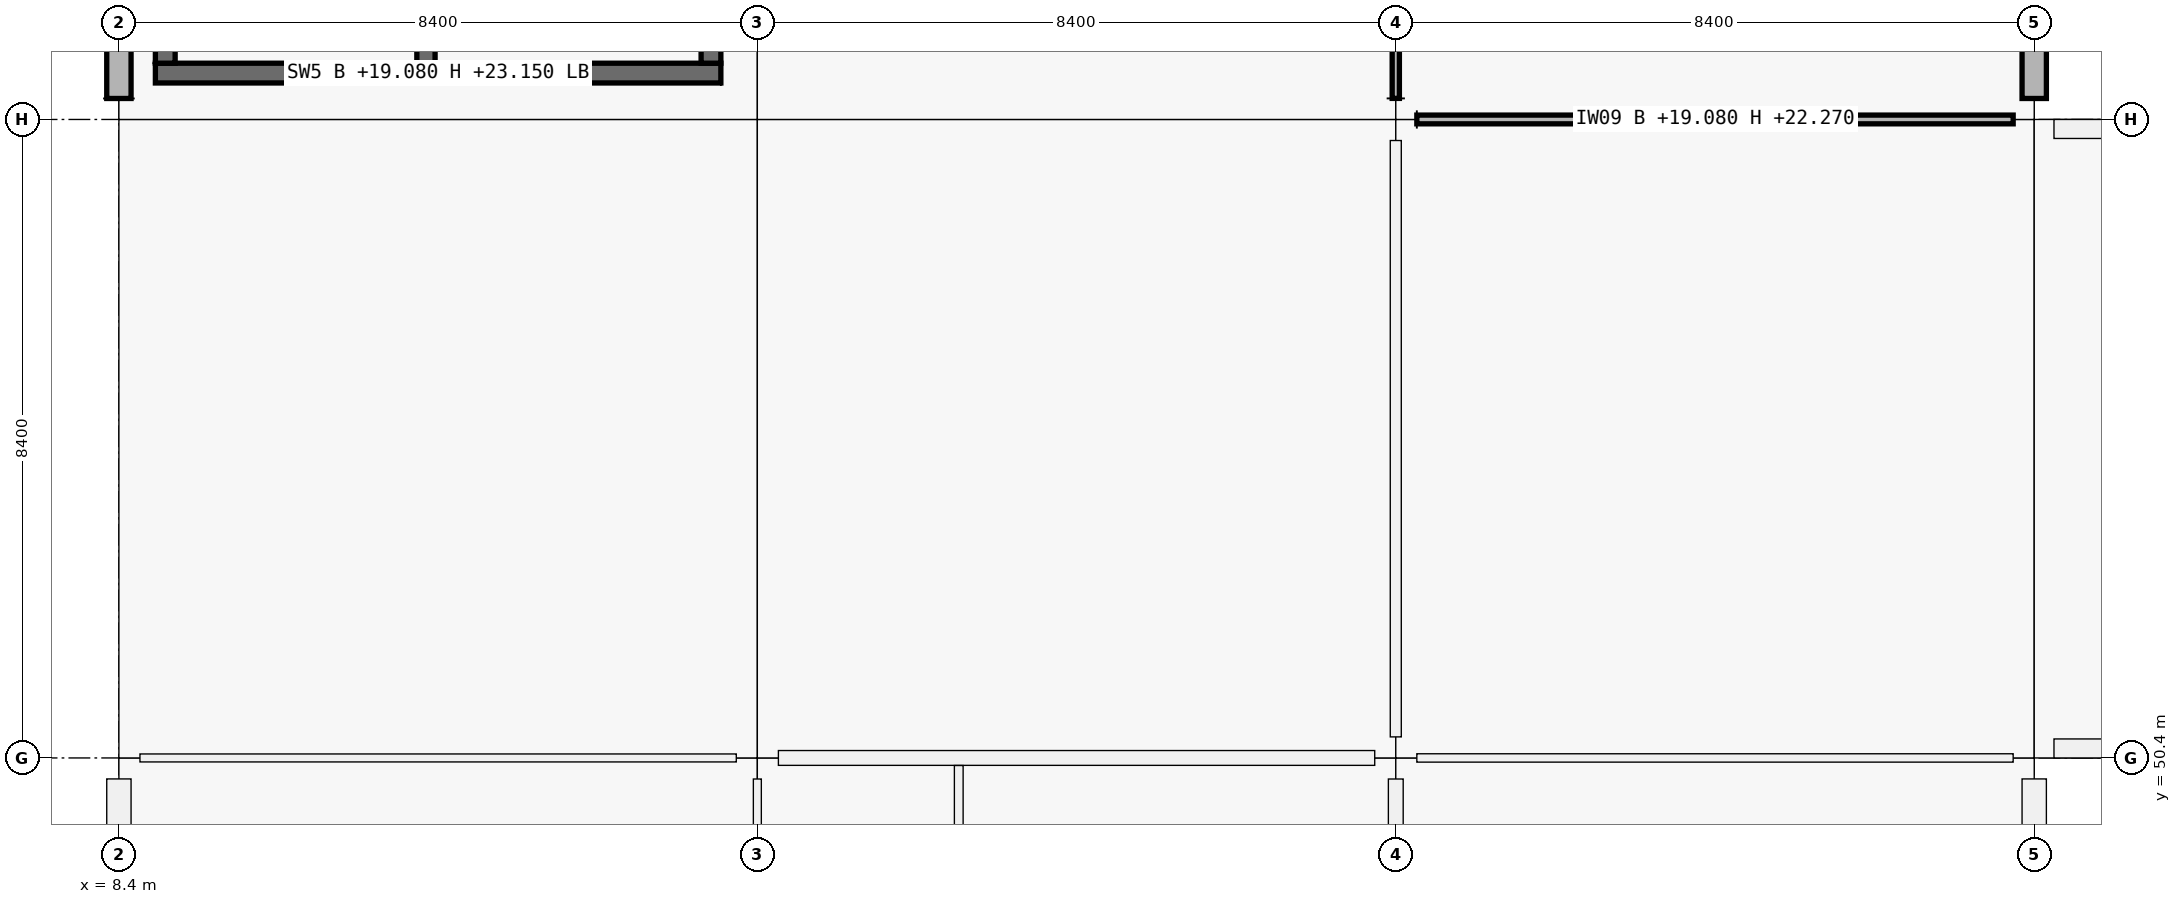
"""IFC4 building model, lengths in metres.
Left out: names, types, materials, properties, quantities, classifications, styles, units other than length and angle.
Written with IfcOpenShell. Run it as: python <this file> out.ifc"""

import sys

from ifc_helpers import new_model, si_unit, direction, frame, frame_2d, origin, origin_2d, place, context, subcontext, project, spatial, rectangle, i_section, extrude, element, fill, save


model = new_model("IFC4")
c1 = context("Model", 3, precision=1e-05, world=origin(), true_north=direction((0.0, 1.0)))
c2 = subcontext(c1, "Body", "Model", "MODEL_VIEW")
j1 = project(units=[si_unit("LENGTHUNIT", "METRE"), si_unit("PLANEANGLEUNIT", "RADIAN")], contexts=[c1])
p1 = place(None, origin())
s1 = spatial("IfcSite", under=j1, at=p1, CompositionType="ELEMENT")
p2 = place(p1, origin())
s2 = spatial("IfcBuilding", under=s1, at=p2, CompositionType="ELEMENT")
p3 = place(p2, frame((0.0, 0.0, 19.08)))
s3 = spatial("IfcBuildingStorey", under=s2, at=p3, CompositionType="ELEMENT", Elevation=19.08)
for number, where, z_axis, x_axis in (
    (1, (8.4, 50.4, 0.0), (0.0, 0.0, 1.0), (1.0, 0.0, 0.0)),
    (2, (8.4, 58.8, 0.0), (0.0, 0.0, 1.0), (1.0, 0.0, 0.0)),
    (3, (16.8, 50.4, 0.0), (0.0, 0.0, 1.0), (1.0, 0.0, 0.0)),
    (4, (16.8, 58.8, 0.0), (0.0, 0.0, 1.0), (1.0, 0.0, 0.0)),
    (5, (25.2, 50.4, 0.0), (0.0, 0.0, 1.0), (1.0, 0.0, 0.0)),
    (6, (25.2, 58.8, 0.0), (0.0, 0.0, 1.0), (1.0, 0.0, 0.0)),
    (7, (33.6, 50.4, 0.0), (0.0, 0.0, 1.0), (1.0, 0.0, 0.0)),
    (8, (33.6, 58.8, 0.0), (0.0, 0.0, 1.0), (1.0, 0.0, 0.0)),
):
    element("IfcColumn", number, at=place(p3, frame(where, z_axis=z_axis, x_axis=x_axis)), inside=s3, PredefinedType="COLUMN", context=c2, shape_type="SweptSolid", body=[
        extrude(rectangle(XDim=0.55, YDim=0.55, at=origin_2d()), origin(), (0.0, 0.0, 1.0), 4.16),
    ])
for number, where, z_axis, x_axis in (
    (9, (16.8, 50.4, 4.16), (0.0, 0.0, 1.0), (1.0, 0.0, 0.0)),
    (10, (25.2, 50.4, 4.16), (0.0, 0.0, 1.0), (1.0, 0.0, 0.0)),
    (11, (16.8, 58.8, 4.16), (0.0, 0.0, 1.0), (1.0, 0.0, 0.0)),
    (12, (25.2, 58.8, 4.16), (0.0, 0.0, 1.0), (1.0, 0.0, 0.0)),
):
    element("IfcColumn", number, at=place(p3, frame(where, z_axis=z_axis, x_axis=x_axis)), inside=s3, PredefinedType="COLUMN", context=c2, shape_type="SweptSolid", body=[
        extrude(i_section(OverallWidth=0.305, OverallDepth=0.308, WebThickness=0.01, FlangeThickness=0.015, FilletRadius=0.017, at=origin_2d()), origin(), (0.0, 0.0, 1.0), 1.925),
    ])
for number, where, z_axis, x_axis in (
    (13, (8.4, 42.276, 0.0), (0.0, 0.0, 1.0), (0.0, 1.0, 0.0)),
    (14, (8.4, 59.076, 0.0), (0.0, 0.0, 1.0), (0.0, 1.0, 0.0)),
):
    element("IfcWall", number, at=place(p3, frame(where, z_axis=z_axis, x_axis=x_axis)), inside=s3, PredefinedType="SOLIDWALL", context=c2, shape_type="SweptSolid", body=[
        extrude(rectangle(XDim=7.848, YDim=0.32, at=frame_2d((3.924, 0.0))), origin(), (0.0, 0.0, 1.0), 3.37),
    ])
p4 = place(p3, frame((33.6, 50.124, 0.0), z_axis=(0.0, 0.0, 1.0), x_axis=(0.0, -1.0, 0.0)))
e15 = element("IfcWall", 15, at=p4, inside=s3, PredefinedType="SOLIDWALL", context=c2, shape_type="SweptSolid", body=[
    extrude(rectangle(XDim=7.848, YDim=0.32, at=frame_2d((3.924, 0.0))), origin(), (0.0, 0.0, 1.0), 3.37),
])
p5 = place(p4, frame((3.174, 0.0, 0.9)))
e16 = element("IfcOpeningElement", 16, at=p5, cuts=e15, PredefinedType="OPENING", context=c2, shape_type="SweptSolid", body=[
    extrude(rectangle(XDim=1.5, YDim=1.2, at=frame_2d((0.75, 0.6))), frame((0.0, 0.16, 0.0), z_axis=(0.0, -1.0, 0.0), x_axis=(1.0, 0.0, 0.0)), (0.0, 0.0, 1.0), 0.32),
])
p6 = place(p3, frame((33.6, 66.924, 0.0), z_axis=(0.0, 0.0, 1.0), x_axis=(0.0, -1.0, 0.0)))
e17 = element("IfcWall", 17, at=p6, inside=s3, PredefinedType="SOLIDWALL", context=c2, shape_type="SweptSolid", body=[
    extrude(rectangle(XDim=7.848, YDim=0.32, at=frame_2d((3.924, 0.0))), origin(), (0.0, 0.0, 1.0), 3.37),
])
p7 = place(p6, frame((3.474, 0.0, 0.9)))
e18 = element("IfcOpeningElement", 18, at=p7, cuts=e17, PredefinedType="OPENING", context=c2, shape_type="SweptSolid", body=[
    extrude(rectangle(XDim=0.9, YDim=1.5, at=frame_2d((0.45, 0.75))), frame((0.0, 0.16, 0.0), z_axis=(0.0, -1.0, 0.0), x_axis=(1.0, 0.0, 0.0)), (0.0, 0.0, 1.0), 0.32),
])
for number, where, z_axis, x_axis in (
    (19, (41.74, 50.525, 0.0), (0.0, 0.0, 1.0), (-1.0, 0.0, 0.0)),
    (20, (33.86, 58.675, 0.0), (0.0, 0.0, 1.0), (1.0, 0.0, 0.0)),
):
    element("IfcWall", number, at=place(p3, frame(where, z_axis=z_axis, x_axis=x_axis)), inside=s3, PredefinedType="PARAPET", context=c2, shape_type="SweptSolid", body=[
        extrude(rectangle(XDim=7.88, YDim=0.25, at=frame_2d((3.94, 0.0))), origin(), (0.0, 0.0, 1.0), 0.95),
    ])
p8 = place(p3, frame((16.32, 59.41, 0.0), z_axis=(0.0, 0.0, 1.0), x_axis=(-1.0, 0.0, 0.0)))
e21 = element("IfcWall", 21, at=p8, inside=s3, PredefinedType="SHEAR", context=c2, shape_type="SweptSolid", body=[
    extrude(rectangle(XDim=7.44, YDim=0.26, at=frame_2d((3.72, 0.0))), origin(), (0.0, 0.0, 1.0), 4.07),
])
p9 = place(p8, frame((1.28, 0.0, 0.0)))
e22 = element("IfcOpeningElement", 22, at=p9, cuts=e21, PredefinedType="OPENING", context=c2, shape_type="SweptSolid", body=[
    extrude(rectangle(XDim=1.5, YDim=2.15, at=frame_2d((0.75, 1.075))), frame((0.0, 0.13, 0.0), z_axis=(0.0, -1.0, 0.0), x_axis=(1.0, 0.0, 0.0)), (0.0, 0.0, 1.0), 0.26),
])
for number, where, z_axis, x_axis in (
    (23, (9.01, 59.54, 0.0), (0.0, 0.0, 1.0), (0.0, 1.0, 0.0)),
    (24, (16.19, 66.46, 0.0), (0.0, 0.0, 1.0), (0.0, -1.0, 0.0)),
):
    element("IfcWall", number, at=place(p3, frame(where, z_axis=z_axis, x_axis=x_axis)), inside=s3, PredefinedType="SHEAR", context=c2, shape_type="SweptSolid", body=[
        extrude(rectangle(XDim=6.92, YDim=0.26, at=frame_2d((3.46, 0.0))), origin(), (0.0, 0.0, 1.0), 4.07),
    ])
p10 = place(p3, frame((12.44, 59.54, 0.0), z_axis=(0.0, 0.0, 1.0), x_axis=(0.0, 1.0, 0.0)))
e25 = element("IfcWall", 25, at=p10, inside=s3, PredefinedType="SHEAR", context=c2, shape_type="SweptSolid", body=[
    extrude(rectangle(XDim=6.92, YDim=0.24, at=frame_2d((3.46, 0.0))), origin(), (0.0, 0.0, 1.0), 4.07),
])
p11 = place(p10, frame((0.12, 0.0, 0.0)))
e26 = element("IfcOpeningElement", 26, at=p11, cuts=e25, PredefinedType="OPENING", context=c2, shape_type="SweptSolid", body=[
    extrude(rectangle(XDim=1.0, YDim=2.15, at=frame_2d((0.5, 1.075))), frame((0.0, 0.12, 0.0), z_axis=(0.0, -1.0, 0.0), x_axis=(1.0, 0.0, 0.0)), (0.0, 0.0, 1.0), 0.24),
])
p12 = place(p3, frame((8.677, 50.4, 0.0), z_axis=(0.0, 0.0, 1.0), x_axis=(1.0, 0.0, 0.0)))
e27 = element("IfcWall", 27, at=p12, inside=s3, PredefinedType="PARTITIONING", context=c2, shape_type="SweptSolid", body=[
    extrude(rectangle(XDim=7.846, YDim=0.105, at=frame_2d((3.923, 0.0))), origin(), (0.0, 0.0, 1.0), 3.19),
])
p13 = place(p12, frame((3.398, 0.0, 0.0)))
e28 = element("IfcOpeningElement", 28, at=p13, cuts=e27, PredefinedType="OPENING", context=c2, shape_type="SweptSolid", body=[
    extrude(rectangle(XDim=1.05, YDim=2.12, at=frame_2d((0.525, 1.06))), frame((0.0, 0.052, 0.0), z_axis=(0.0, -1.0, 0.0), x_axis=(1.0, 0.0, 0.0)), (0.0, 0.0, 1.0), 0.105),
])
p14 = place(p3, frame((17.077, 50.4, 0.0), z_axis=(0.0, 0.0, 1.0), x_axis=(1.0, 0.0, 0.0)))
e29 = element("IfcWall", 29, at=p14, inside=s3, PredefinedType="PARTITIONING", context=c2, shape_type="SweptSolid", body=[
    extrude(rectangle(XDim=7.846, YDim=0.195, at=frame_2d((3.923, 0.0))), origin(), (0.0, 0.0, 1.0), 3.19),
])
p15 = place(p14, frame((0.718, 0.0, 0.0)))
e30 = element("IfcOpeningElement", 30, at=p15, cuts=e29, PredefinedType="OPENING", context=c2, shape_type="SweptSolid", body=[
    extrude(rectangle(XDim=0.94, YDim=2.08, at=frame_2d((0.47, 1.04))), frame((0.0, 0.098, 0.0), z_axis=(0.0, -1.0, 0.0), x_axis=(1.0, 0.0, 0.0)), (0.0, 0.0, 1.0), 0.195),
])
p16 = place(p14, frame((4.628, 0.0, 0.0)))
e31 = element("IfcOpeningElement", 31, at=p16, cuts=e29, PredefinedType="OPENING", context=c2, shape_type="SweptSolid", body=[
    extrude(rectangle(XDim=0.96, YDim=2.1, at=frame_2d((0.48, 1.05))), frame((0.0, 0.098, 0.0), z_axis=(0.0, -1.0, 0.0), x_axis=(1.0, 0.0, 0.0)), (0.0, 0.0, 1.0), 0.195),
])
p17 = place(p3, frame((25.477, 50.4, 0.0), z_axis=(0.0, 0.0, 1.0), x_axis=(1.0, 0.0, 0.0)))
e32 = element("IfcWall", 32, at=p17, inside=s3, PredefinedType="MOVABLE", context=c2, shape_type="SweptSolid", body=[
    extrude(rectangle(XDim=7.846, YDim=0.11, at=frame_2d((3.923, 0.0))), origin(), (0.0, 0.0, 1.0), 3.19),
])
p18 = place(p17, frame((3.433, 0.0, 0.0)))
e33 = element("IfcOpeningElement", 33, at=p18, cuts=e32, PredefinedType="OPENING", context=c2, shape_type="SweptSolid", body=[
    extrude(rectangle(XDim=0.98, YDim=2.18, at=frame_2d((0.49, 1.09))), frame((0.0, 0.055, 0.0), z_axis=(0.0, -1.0, 0.0), x_axis=(1.0, 0.0, 0.0)), (0.0, 0.0, 1.0), 0.11),
])
p19 = place(p3, frame((25.477, 58.8, 0.0), z_axis=(0.0, 0.0, 1.0), x_axis=(1.0, 0.0, 0.0)))
e34 = element("IfcWall", 34, at=p19, inside=s3, PredefinedType="PARTITIONING", context=c2, shape_type="SweptSolid", body=[
    extrude(rectangle(XDim=7.846, YDim=0.115, at=frame_2d((3.923, 0.0))), origin(), (0.0, 0.0, 1.0), 3.19),
])
p20 = place(p19, frame((3.443, 0.0, 0.0)))
e35 = element("IfcOpeningElement", 35, at=p20, cuts=e34, PredefinedType="OPENING", context=c2, shape_type="SweptSolid", body=[
    extrude(rectangle(XDim=0.96, YDim=2.18, at=frame_2d((0.48, 1.09))), frame((0.0, 0.058, 0.0), z_axis=(0.0, -1.0, 0.0), x_axis=(1.0, 0.0, 0.0)), (0.0, 0.0, 1.0), 0.115),
])
p21 = place(p3, frame((16.8, 42.277, 0.0), z_axis=(0.0, 0.0, 1.0), x_axis=(0.0, 1.0, 0.0)))
e36 = element("IfcWall", 36, at=p21, inside=s3, PredefinedType="PARTITIONING", context=c2, shape_type="SweptSolid", body=[
    extrude(rectangle(XDim=7.846, YDim=0.105, at=frame_2d((3.923, 0.0))), origin(), (0.0, 0.0, 1.0), 3.19),
])
p22 = place(p3, frame((25.2, 42.277, 0.0), z_axis=(0.0, 0.0, 1.0), x_axis=(0.0, 1.0, 0.0)))
e37 = element("IfcWall", 37, at=p22, inside=s3, PredefinedType="PARTITIONING", context=c2, shape_type="SweptSolid", body=[
    extrude(rectangle(XDim=7.846, YDim=0.195, at=frame_2d((3.923, 0.0))), origin(), (0.0, 0.0, 1.0), 3.19),
])
p23 = place(p3, frame((25.2, 50.677, 0.0), z_axis=(0.0, 0.0, 1.0), x_axis=(0.0, 1.0, 0.0)))
e38 = element("IfcWall", 38, at=p23, inside=s3, PredefinedType="PARTITIONING", context=c2, shape_type="SweptSolid", body=[
    extrude(rectangle(XDim=7.846, YDim=0.145, at=frame_2d((3.923, 0.0))), origin(), (0.0, 0.0, 1.0), 3.19),
])
p24 = place(p23, frame((3.423, 0.0, 0.0)))
e39 = element("IfcOpeningElement", 39, at=p24, cuts=e38, PredefinedType="OPENING", context=c2, shape_type="SweptSolid", body=[
    extrude(rectangle(XDim=1.0, YDim=2.2, at=frame_2d((0.5, 1.1))), frame((0.0, 0.073, 0.0), z_axis=(0.0, -1.0, 0.0), x_axis=(1.0, 0.0, 0.0)), (0.0, 0.0, 1.0), 0.145),
])
p25 = place(p3, frame((25.2, 59.077, 0.0), z_axis=(0.0, 0.0, 1.0), x_axis=(0.0, 1.0, 0.0)))
e40 = element("IfcWall", 40, at=p25, inside=s3, PredefinedType="PARTITIONING", context=c2, shape_type="SweptSolid", body=[
    extrude(rectangle(XDim=7.846, YDim=0.095, at=frame_2d((3.923, 0.0))), origin(), (0.0, 0.0, 1.0), 3.19),
])
p26 = place(p25, frame((3.433, 0.0, 0.0)))
e41 = element("IfcOpeningElement", 41, at=p26, cuts=e40, PredefinedType="OPENING", context=c2, shape_type="SweptSolid", body=[
    extrude(rectangle(XDim=0.98, YDim=2.18, at=frame_2d((0.49, 1.09))), frame((0.0, 0.047, 0.0), z_axis=(0.0, -1.0, 0.0), x_axis=(1.0, 0.0, 0.0)), (0.0, 0.0, 1.0), 0.095),
])
p27 = place(p3, frame((19.45, 42.064, 0.0), z_axis=(0.0, 0.0, 1.0), x_axis=(0.0, 1.0, 0.0)))
e42 = element("IfcWall", 42, at=p27, inside=s3, PredefinedType="PARTITIONING", context=c2, shape_type="SweptSolid", body=[
    extrude(rectangle(XDim=8.236, YDim=0.115, at=frame_2d((4.118, 0.0))), origin(), (0.0, 0.0, 1.0), 3.19),
])
p28 = place(p11, origin())
e43 = element("IfcDoor", 43, at=p28, inside=s3, OperationType="SINGLE_SWING_LEFT", PredefinedType="DOOR", context=c2, shape_type="SweptSolid", body=[
    extrude(rectangle(XDim=1.0, YDim=2.15, at=frame_2d((0.5, 1.075))), frame((0.0, 0.025, 0.0), z_axis=(0.0, -1.0, 0.0), x_axis=(1.0, 0.0, 0.0)), (0.0, 0.0, 1.0), 0.05),
])
fill(e26, e43)
p29 = place(p9, origin())
e44 = element("IfcDoor", 44, at=p29, inside=s3, OperationType="DOUBLE_DOOR_SINGLE_SWING", PredefinedType="DOOR", context=c2, shape_type="SweptSolid", body=[
    extrude(rectangle(XDim=1.5, YDim=2.15, at=frame_2d((0.75, 1.075))), frame((0.0, 0.025, 0.0), z_axis=(0.0, -1.0, 0.0), x_axis=(1.0, 0.0, 0.0)), (0.0, 0.0, 1.0), 0.05),
])
fill(e22, e44)
p30 = place(p15, origin())
e45 = element("IfcDoor", 45, at=p30, inside=s3, OperationType="SINGLE_SWING_LEFT", PredefinedType="DOOR", context=c2, shape_type="SweptSolid", body=[
    extrude(rectangle(XDim=0.94, YDim=2.08, at=frame_2d((0.47, 1.04))), frame((0.0, 0.025, 0.0), z_axis=(0.0, -1.0, 0.0), x_axis=(1.0, 0.0, 0.0)), (0.0, 0.0, 1.0), 0.05),
])
fill(e30, e45)
p31 = place(p16, origin())
e46 = element("IfcDoor", 46, at=p31, inside=s3, OperationType="SINGLE_SWING_RIGHT", PredefinedType="DOOR", context=c2, shape_type="SweptSolid", body=[
    extrude(rectangle(XDim=0.96, YDim=2.1, at=frame_2d((0.48, 1.05))), frame((0.0, 0.025, 0.0), z_axis=(0.0, -1.0, 0.0), x_axis=(1.0, 0.0, 0.0)), (0.0, 0.0, 1.0), 0.05),
])
fill(e31, e46)
p32 = place(p13, origin())
e47 = element("IfcDoor", 47, at=p32, inside=s3, OperationType="SINGLE_SWING_RIGHT", PredefinedType="DOOR", context=c2, shape_type="SweptSolid", body=[
    extrude(rectangle(XDim=1.05, YDim=2.12, at=frame_2d((0.525, 1.06))), frame((0.0, 0.025, 0.0), z_axis=(0.0, -1.0, 0.0), x_axis=(1.0, 0.0, 0.0)), (0.0, 0.0, 1.0), 0.05),
])
fill(e28, e47)
p33 = place(p24, origin())
e48 = element("IfcDoor", 48, at=p33, inside=s3, OperationType="SINGLE_SWING_RIGHT", PredefinedType="DOOR", context=c2, shape_type="SweptSolid", body=[
    extrude(rectangle(XDim=1.0, YDim=2.2, at=frame_2d((0.5, 1.1))), frame((0.0, 0.025, 0.0), z_axis=(0.0, -1.0, 0.0), x_axis=(1.0, 0.0, 0.0)), (0.0, 0.0, 1.0), 0.05),
])
fill(e39, e48)
p34 = place(p18, origin())
e49 = element("IfcDoor", 49, at=p34, inside=s3, OperationType="SINGLE_SWING_RIGHT", PredefinedType="DOOR", context=c2, shape_type="SweptSolid", body=[
    extrude(rectangle(XDim=0.98, YDim=2.18, at=frame_2d((0.49, 1.09))), frame((0.0, 0.025, 0.0), z_axis=(0.0, -1.0, 0.0), x_axis=(1.0, 0.0, 0.0)), (0.0, 0.0, 1.0), 0.05),
])
fill(e33, e49)
p35 = place(p20, origin())
e50 = element("IfcDoor", 50, at=p35, inside=s3, OperationType="SINGLE_SWING_LEFT", PredefinedType="DOOR", context=c2, shape_type="SweptSolid", body=[
    extrude(rectangle(XDim=0.96, YDim=2.18, at=frame_2d((0.48, 1.09))), frame((0.0, 0.025, 0.0), z_axis=(0.0, -1.0, 0.0), x_axis=(1.0, 0.0, 0.0)), (0.0, 0.0, 1.0), 0.05),
])
fill(e35, e50)
save(model, sys.argv[1])
